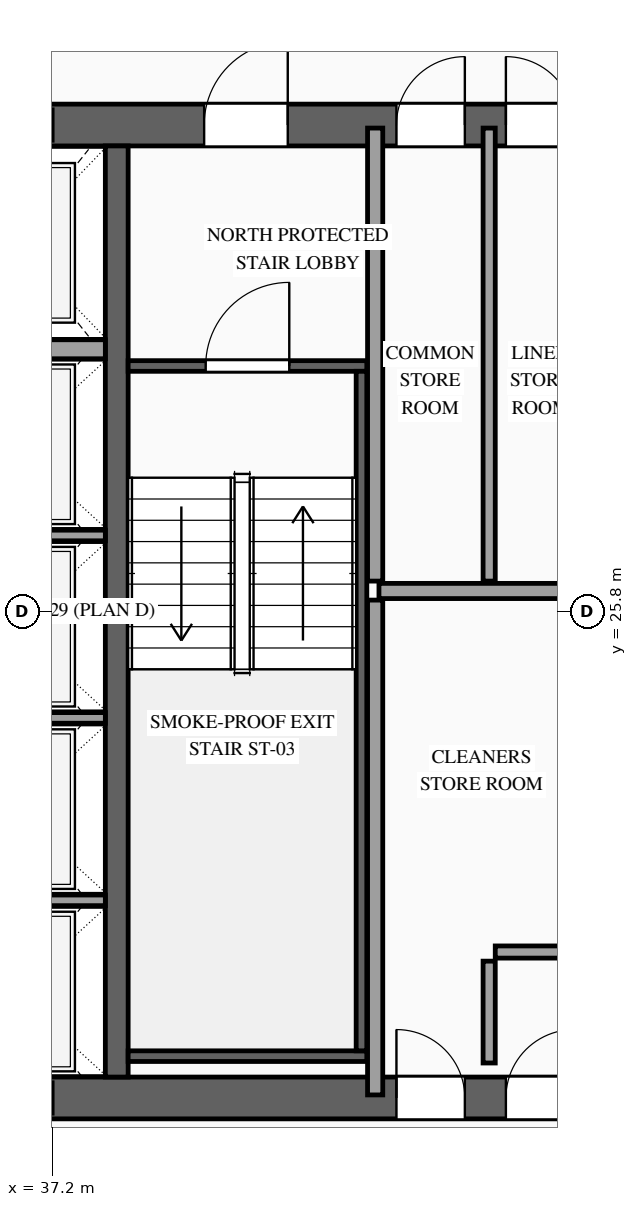
"""IFC4 building model, lengths in metres.
Left out: names, types, materials, properties, quantities, classifications, styles, units other than length and angle.
Written with IfcOpenShell. Run it as: python <this file> out.ifc"""

import sys

from ifc_helpers import new_model, si_unit, direction, frame, frame_2d, origin, place, context, subcontext, project, spatial, rectangle, extrude, source, transform, mapped, element, fill, save


model = new_model("IFC4")
c1 = context("Model", 3, precision=1e-05, world=origin(), true_north=direction((0.0, 1.0)))
c2 = subcontext(c1, "Body", "Model", "MODEL_VIEW")
j1 = project(units=[si_unit("LENGTHUNIT", "METRE"), si_unit("PLANEANGLEUNIT", "RADIAN")], contexts=[c1])
p1 = place(None, origin())
s1 = spatial("IfcSite", under=j1, at=p1, CompositionType="ELEMENT")
p2 = place(p1, origin())
s2 = spatial("IfcBuilding", under=s1, at=p2, CompositionType="ELEMENT")
p3 = place(p2, frame((0.0, 0.0, 234.6)))
s3 = spatial("IfcBuildingStorey", under=s2, at=p3, CompositionType="ELEMENT", Elevation=234.6)
p4 = place(p3, frame((23.525, 19.4, 0.0), z_axis=(0.0, 0.0, 1.0), x_axis=(1.0, 0.0, 0.0)))
e1 = element("IfcWall", 1, at=p4, inside=s3, PredefinedType="SHEAR", context=c2, shape_type="SweptSolid", body=[
    extrude(rectangle(XDim=26.95, YDim=0.55, at=frame_2d((13.475, 0.0))), origin(), (0.0, 0.0, 1.0), 3.5),
])
p5 = place(p4, frame((1.925, 0.0, 0.0)))
e2 = element("IfcOpeningElement", 2, at=p5, cuts=e1, PredefinedType="OPENING", context=c2, shape_type="SweptSolid", body=[
    extrude(rectangle(XDim=1.1, YDim=2.2, at=frame_2d((0.55, 1.1))), frame((0.0, 0.29, 0.0), z_axis=(0.0, -1.0, 0.0), x_axis=(1.0, 0.0, 0.0)), (0.0, 0.0, 1.0), 0.58),
])
p6 = place(p4, frame((9.825, 0.0, 0.0)))
e3 = element("IfcOpeningElement", 3, at=p6, cuts=e1, PredefinedType="OPENING", context=c2, shape_type="SweptSolid", body=[
    extrude(rectangle(XDim=1.1, YDim=2.2, at=frame_2d((0.55, 1.1))), frame((0.0, 0.29, 0.0), z_axis=(0.0, -1.0, 0.0), x_axis=(1.0, 0.0, 0.0)), (0.0, 0.0, 1.0), 0.58),
])
p7 = place(p4, frame((23.025, 0.0, 0.0)))
e4 = element("IfcOpeningElement", 4, at=p7, cuts=e1, PredefinedType="OPENING", context=c2, shape_type="SweptSolid", body=[
    extrude(rectangle(XDim=1.1, YDim=2.2, at=frame_2d((0.55, 1.1))), frame((0.0, 0.29, 0.0), z_axis=(0.0, -1.0, 0.0), x_axis=(1.0, 0.0, 0.0)), (0.0, 0.0, 1.0), 0.58),
])
p8 = place(p4, frame((19.645, 0.0, 0.0)))
e5 = element("IfcOpeningElement", 5, at=p8, cuts=e1, PredefinedType="OPENING", context=c2, shape_type="SweptSolid", body=[
    extrude(rectangle(XDim=0.9, YDim=2.15, at=frame_2d((0.45, 1.075))), frame((0.0, 0.29, 0.0), z_axis=(0.0, -1.0, 0.0), x_axis=(1.0, 0.0, 0.0)), (0.0, 0.0, 1.0), 0.58),
])
p9 = place(p4, frame((18.205, 0.0, 0.0)))
e6 = element("IfcOpeningElement", 6, at=p9, cuts=e1, PredefinedType="OPENING", context=c2, shape_type="SweptSolid", body=[
    extrude(rectangle(XDim=0.9, YDim=2.15, at=frame_2d((0.45, 1.075))), frame((0.0, 0.29, 0.0), z_axis=(0.0, -1.0, 0.0), x_axis=(1.0, 0.0, 0.0)), (0.0, 0.0, 1.0), 0.58),
])
p10 = place(p3, frame((23.525, 32.2, 0.0), z_axis=(0.0, 0.0, 1.0), x_axis=(1.0, 0.0, 0.0)))
e7 = element("IfcWall", 7, at=p10, inside=s3, PredefinedType="SHEAR", context=c2, shape_type="SweptSolid", body=[
    extrude(rectangle(XDim=26.95, YDim=0.55, at=frame_2d((13.475, 0.0))), origin(), (0.0, 0.0, 1.0), 3.5),
])
p11 = place(p10, frame((4.545, 0.0, 0.0)))
e8 = element("IfcOpeningElement", 8, at=p11, cuts=e7, PredefinedType="OPENING", context=c2, shape_type="SweptSolid", body=[
    extrude(rectangle(XDim=0.9, YDim=2.15, at=frame_2d((0.45, 1.075))), frame((0.0, 0.29, 0.0), z_axis=(0.0, -1.0, 0.0), x_axis=(1.0, 0.0, 0.0)), (0.0, 0.0, 1.0), 0.58),
])
p12 = place(p10, frame((9.825, 0.0, 0.0)))
e9 = element("IfcOpeningElement", 9, at=p12, cuts=e7, PredefinedType="OPENING", context=c2, shape_type="SweptSolid", body=[
    extrude(rectangle(XDim=1.1, YDim=2.2, at=frame_2d((0.55, 1.1))), frame((0.0, 0.29, 0.0), z_axis=(0.0, -1.0, 0.0), x_axis=(1.0, 0.0, 0.0)), (0.0, 0.0, 1.0), 0.58),
])
p13 = place(p10, frame((15.675, 0.0, 0.0)))
e10 = element("IfcOpeningElement", 10, at=p13, cuts=e7, PredefinedType="OPENING", context=c2, shape_type="SweptSolid", body=[
    extrude(rectangle(XDim=1.1, YDim=2.2, at=frame_2d((0.55, 1.1))), frame((0.0, 0.29, 0.0), z_axis=(0.0, -1.0, 0.0), x_axis=(1.0, 0.0, 0.0)), (0.0, 0.0, 1.0), 0.58),
])
p14 = place(p10, frame((18.205, 0.0, 0.0)))
e11 = element("IfcOpeningElement", 11, at=p14, cuts=e7, PredefinedType="OPENING", context=c2, shape_type="SweptSolid", body=[
    extrude(rectangle(XDim=0.9, YDim=2.15, at=frame_2d((0.45, 1.075))), frame((0.0, 0.29, 0.0), z_axis=(0.0, -1.0, 0.0), x_axis=(1.0, 0.0, 0.0)), (0.0, 0.0, 1.0), 0.58),
])
p15 = place(p10, frame((19.645, 0.0, 0.0)))
e12 = element("IfcOpeningElement", 12, at=p15, cuts=e7, PredefinedType="OPENING", context=c2, shape_type="SweptSolid", body=[
    extrude(rectangle(XDim=0.9, YDim=2.15, at=frame_2d((0.45, 1.075))), frame((0.0, 0.29, 0.0), z_axis=(0.0, -1.0, 0.0), x_axis=(1.0, 0.0, 0.0)), (0.0, 0.0, 1.0), 0.58),
])
m1 = source(origin(), c2, "Body", "SweptSolid", [
    extrude(rectangle(XDim=12.25, YDim=0.3, at=frame_2d((6.125, 0.0))), origin(), (0.0, 0.0, 1.0), 3.5),
])
p16 = place(p3, frame((38.05, 19.675, 0.0), z_axis=(0.0, 0.0, 1.0), x_axis=(0.0, 1.0, 0.0)))
e13 = element("IfcWall", 13, at=p16, inside=s3, PredefinedType="SOLIDWALL", context=c2, shape_type="MappedRepresentation", body=[
    mapped(m1, transform((0.0, 0.0, 0.0), scale=1.0)),
])
m2 = source(origin(), c2, "Body", "SweptSolid", [
    extrude(rectangle(XDim=2.4, YDim=0.14, at=frame_2d((1.2, 0.0))), origin(), (0.0, 0.0, 1.0), 3.28),
])
for number, where, z_axis, x_axis in (
    (14, (35.5, 22.0, 0.0), (0.0, 0.0, 1.0), (1.0, 0.0, 0.0)),
    (15, (35.5, 24.4, 0.0), (0.0, 0.0, 1.0), (1.0, 0.0, 0.0)),
    (16, (35.5, 26.8, 0.0), (0.0, 0.0, 1.0), (1.0, 0.0, 0.0)),
):
    element("IfcWall", number, at=place(p3, frame(where, z_axis=z_axis, x_axis=x_axis)), inside=s3, PredefinedType="SOLIDWALL", context=c2, shape_type="MappedRepresentation", body=[
        mapped(m2, transform((0.0, 0.0, 0.0), scale=1.0)),
    ])
m3 = source(origin(), c2, "Body", "SweptSolid", [
    extrude(rectangle(XDim=2.4, YDim=0.25, at=frame_2d((1.2, 0.0))), origin(), (0.0, 0.0, 1.0), 3.28),
])
p17 = place(p3, frame((35.5, 29.25, 0.0), z_axis=(0.0, 0.0, 1.0), x_axis=(1.0, 0.0, 0.0)))
e17 = element("IfcWall", 17, at=p17, inside=s3, PredefinedType="SOLIDWALL", context=c2, shape_type="MappedRepresentation", body=[
    mapped(m3, transform((0.0, 0.0, 0.0), scale=1.0)),
])
p18 = place(p3, frame((38.2, 29.03, 0.0), z_axis=(0.0, 0.0, 1.0), x_axis=(1.0, 0.0, 0.0)))
e18 = element("IfcWall", 18, at=p18, inside=s3, PredefinedType="SOLIDWALL", context=c2, shape_type="SweptSolid", body=[
    extrude(rectangle(XDim=3.14, YDim=0.14, at=frame_2d((1.57, 0.0))), origin(), (0.0, 0.0, 1.0), 3.28),
])
p19 = place(p18, frame((1.02, 0.0, 0.0)))
e19 = element("IfcOpeningElement", 19, at=p19, cuts=e18, PredefinedType="OPENING", context=c2, shape_type="SweptSolid", body=[
    extrude(rectangle(XDim=1.1, YDim=2.2, at=frame_2d((0.55, 1.1))), frame((0.0, 0.085, 0.0), z_axis=(0.0, -1.0, 0.0), x_axis=(1.0, 0.0, 0.0)), (0.0, 0.0, 1.0), 0.17),
])
m4 = source(origin(), c2, "Body", "SweptSolid", [
    extrude(rectangle(XDim=3.14, YDim=0.14, at=frame_2d((1.57, 0.0))), origin(), (0.0, 0.0, 1.0), 3.28),
])
p20 = place(p3, frame((38.2, 19.95, 0.0), z_axis=(0.0, 0.0, 1.0), x_axis=(1.0, 0.0, 0.0)))
e20 = element("IfcWall", 20, at=p20, inside=s3, PredefinedType="SOLIDWALL", context=c2, shape_type="MappedRepresentation", body=[
    mapped(m4, transform((0.0, 0.0, 0.0), scale=1.0)),
])
m5 = source(origin(), c2, "Body", "SweptSolid", [
    extrude(rectangle(XDim=8.94, YDim=0.14, at=frame_2d((4.47, 0.0))), origin(), (0.0, 0.0, 1.0), 3.28),
])
p21 = place(p3, frame((41.27, 20.02, 0.0), z_axis=(0.0, 0.0, 1.0), x_axis=(0.0, 1.0, 0.0)))
e21 = element("IfcWall", 21, at=p21, inside=s3, PredefinedType="SOLIDWALL", context=c2, shape_type="MappedRepresentation", body=[
    mapped(m5, transform((0.0, 0.0, 0.0), scale=1.0)),
])
m6 = source(origin(), c2, "Body", "SweptSolid", [
    extrude(rectangle(XDim=1.34, YDim=0.16, at=frame_2d((0.67, 0.0))), origin(), (0.0, 0.0, 1.0), 3.28),
])
p22 = place(p3, frame((42.95, 19.86, 0.0), z_axis=(0.0, 0.0, 1.0), x_axis=(0.0, 1.0, 0.0)))
e22 = element("IfcWall", 22, at=p22, inside=s3, PredefinedType="PARTITIONING", context=c2, shape_type="MappedRepresentation", body=[
    mapped(m6, transform((0.0, 0.0, 0.0), scale=1.0)),
])
m7 = source(origin(), c2, "Body", "SweptSolid", [
    extrude(rectangle(XDim=1.17, YDim=0.16, at=frame_2d((0.585, 0.0))), origin(), (0.0, 0.0, 1.0), 3.28),
])
p23 = place(p3, frame((43.03, 21.32, 0.0), z_axis=(0.0, 0.0, 1.0), x_axis=(1.0, 0.0, 0.0)))
e23 = element("IfcWall", 23, at=p23, inside=s3, PredefinedType="PARTITIONING", context=c2, shape_type="MappedRepresentation", body=[
    mapped(m7, transform((0.0, 0.0, 0.0), scale=1.0)),
])
m8 = source(origin(), c2, "Body", "SweptSolid", [
    extrude(rectangle(XDim=6.51, YDim=0.2, at=frame_2d((3.255, 0.0))), origin(), (0.0, 0.0, 1.0), 3.28),
])
p24 = place(p3, frame((41.45, 19.44, 0.0), z_axis=(0.0, 0.0, 1.0), x_axis=(0.0, 1.0, 0.0)))
e24 = element("IfcWall", 24, at=p24, inside=s3, PredefinedType="PARTITIONING", context=c2, shape_type="MappedRepresentation", body=[
    mapped(m8, transform((0.0, 0.0, 0.0), scale=1.0)),
])
m9 = source(origin(), c2, "Body", "SweptSolid", [
    extrude(rectangle(XDim=2.7, YDim=0.2, at=frame_2d((1.35, 0.0))), origin(), (0.0, 0.0, 1.0), 3.28),
])
p25 = place(p3, frame((41.5, 26.07, 0.0), z_axis=(0.0, 0.0, 1.0), x_axis=(1.0, 0.0, 0.0)))
e25 = element("IfcWall", 25, at=p25, inside=s3, PredefinedType="PARTITIONING", context=c2, shape_type="MappedRepresentation", body=[
    mapped(m9, transform((0.0, 0.0, 0.0), scale=1.0)),
])
m10 = source(origin(), c2, "Body", "SweptSolid", [
    extrude(rectangle(XDim=5.96, YDim=0.2, at=frame_2d((2.98, 0.0))), origin(), (0.0, 0.0, 1.0), 3.28),
])
p26 = place(p3, frame((41.45, 26.2, 0.0), z_axis=(0.0, 0.0, 1.0), x_axis=(0.0, 1.0, 0.0)))
e26 = element("IfcWall", 26, at=p26, inside=s3, PredefinedType="PARTITIONING", context=c2, shape_type="MappedRepresentation", body=[
    mapped(m10, transform((0.0, 0.0, 0.0), scale=1.0)),
])
m11 = source(origin(), c2, "Body", "SweptSolid", [
    extrude(rectangle(XDim=5.96, YDim=0.16, at=frame_2d((2.98, 0.0))), origin(), (0.0, 0.0, 1.0), 3.28),
])
p27 = place(p3, frame((42.95, 26.2, 0.0), z_axis=(0.0, 0.0, 1.0), x_axis=(0.0, 1.0, 0.0)))
e27 = element("IfcWall", 27, at=p27, inside=s3, PredefinedType="PARTITIONING", context=c2, shape_type="MappedRepresentation", body=[
    mapped(m11, transform((0.0, 0.0, 0.0), scale=1.0)),
])
m12 = source(origin(), c2, "Body", "SweptSolid", [
    extrude(rectangle(XDim=1.1, YDim=2.2, at=frame_2d((0.55, 1.1))), frame((0.0, 0.025, 0.0), z_axis=(0.0, -1.0, 0.0), x_axis=(1.0, 0.0, 0.0)), (0.0, 0.0, 1.0), 0.05),
])
p28 = place(p19, origin())
e28 = element("IfcDoor", 28, at=p28, inside=s3, OperationType="SINGLE_SWING_RIGHT", PredefinedType="DOOR", context=c2, shape_type="MappedRepresentation", body=[
    mapped(m12, transform((0.0, 0.0, 0.0), scale=1.0)),
])
fill(e19, e28)
p29 = place(p13, origin())
e29 = element("IfcDoor", 29, at=p29, inside=s3, OperationType="SINGLE_SWING_RIGHT", PredefinedType="DOOR", context=c2, shape_type="MappedRepresentation", body=[
    mapped(m12, transform((0.0, 0.0, 0.0), scale=1.0)),
])
fill(e10, e29)
m13 = source(origin(), c2, "Body", "SweptSolid", [
    extrude(rectangle(XDim=0.9, YDim=2.15, at=frame_2d((0.45, 1.075))), frame((0.0, 0.025, 0.0), z_axis=(0.0, -1.0, 0.0), x_axis=(1.0, 0.0, 0.0)), (0.0, 0.0, 1.0), 0.05),
])
p30 = place(p8, origin())
e30 = element("IfcDoor", 30, at=p30, inside=s3, OperationType="SINGLE_SWING_RIGHT", PredefinedType="DOOR", context=c2, shape_type="MappedRepresentation", body=[
    mapped(m13, transform((0.0, 0.0, 0.0), scale=1.0)),
])
fill(e5, e30)
p31 = place(p9, origin())
e31 = element("IfcDoor", 31, at=p31, inside=s3, OperationType="SINGLE_SWING_LEFT", PredefinedType="DOOR", context=c2, shape_type="MappedRepresentation", body=[
    mapped(m13, transform((0.0, 0.0, 0.0), scale=1.0)),
])
fill(e6, e31)
p32 = place(p14, origin())
e32 = element("IfcDoor", 32, at=p32, inside=s3, OperationType="SINGLE_SWING_RIGHT", PredefinedType="DOOR", context=c2, shape_type="MappedRepresentation", body=[
    mapped(m13, transform((0.0, 0.0, 0.0), scale=1.0)),
])
fill(e11, e32)
p33 = place(p15, origin())
e33 = element("IfcDoor", 33, at=p33, inside=s3, OperationType="SINGLE_SWING_LEFT", PredefinedType="DOOR", context=c2, shape_type="MappedRepresentation", body=[
    mapped(m13, transform((0.0, 0.0, 0.0), scale=1.0)),
])
fill(e12, e33)
save(model, sys.argv[1])
